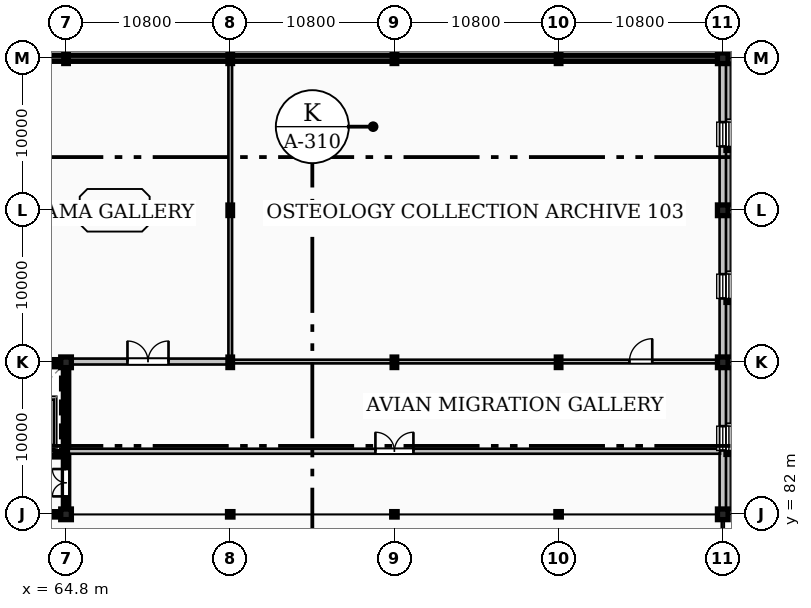
"""IFC4 building model, lengths in metres.
Left out: names, types, materials, properties, quantities, classifications, styles, units other than length and angle.
Written with IfcOpenShell. Run it as: python <this file> out.ifc"""

import sys

from ifc_helpers import new_model, si_unit, direction, frame, frame_2d, origin, origin_2d, place, context, subcontext, project, spatial, rectangle, hollow_circle, i_section, extrude, element, fill, save


model = new_model("IFC4")
c1 = context("Model", 3, precision=1e-05, world=origin(), true_north=direction((0.0, 1.0)))
c2 = subcontext(c1, "Body", "Model", "MODEL_VIEW")
j1 = project(units=[si_unit("LENGTHUNIT", "METRE"), si_unit("PLANEANGLEUNIT", "RADIAN")], contexts=[c1])
p1 = place(None, origin())
s1 = spatial("IfcSite", under=j1, at=p1, CompositionType="ELEMENT")
p2 = place(p1, origin())
s2 = spatial("IfcBuilding", under=s1, at=p2, CompositionType="ELEMENT")
p3 = place(p2, frame((0.0, 0.0, 4.8)))
s3 = spatial("IfcBuildingStorey", under=s2, at=p3, CompositionType="ELEMENT", Elevation=4.8)
p4 = place(p3, frame((32.4, 112.0, 0.0), z_axis=(0.0, 0.0, 1.0), x_axis=(1.0, 0.0, 0.0)))
e1 = element("IfcWall", 1, at=p4, inside=s3, PredefinedType="USERDEFINED", context=c2, shape_type="SweptSolid", body=[
    extrude(rectangle(XDim=32.4, YDim=0.4, at=frame_2d((16.2, 0.0))), origin(), (0.0, 0.0, 1.0), 4.56),
])
p5 = place(p3, frame((64.8, 112.0, 0.0), z_axis=(0.0, 0.0, 1.0), x_axis=(1.0, 0.0, 0.0)))
e2 = element("IfcWall", 2, at=p5, inside=s3, PredefinedType="USERDEFINED", context=c2, shape_type="SweptSolid", body=[
    extrude(rectangle(XDim=43.42, YDim=0.4, at=frame_2d((21.71, 0.0))), origin(), (0.0, 0.0, 1.0), 4.56),
])
for number, where, z_axis, x_axis in (
    (3, (64.8, 82.0, 0.0), (0.0, 0.0, 1.0), (1.0, 0.0, 0.0)),
    (4, (64.8, 92.0, 0.0), (0.0, 0.0, 1.0), (1.0, 0.0, 0.0)),
):
    element("IfcColumn", number, at=place(p3, frame(where, z_axis=z_axis, x_axis=x_axis)), inside=s3, PredefinedType="COLUMN", context=c2, shape_type="SweptSolid", body=[
        extrude(rectangle(XDim=0.7, YDim=0.7, at=origin_2d()), origin(), (0.0, 0.0, 1.0), 4.8),
    ])
for number, where, z_axis, x_axis in (
    (5, (64.8, 102.0, 0.0), (0.0, 0.0, 1.0), (1.0, 0.0, 0.0)),
    (6, (64.8, 112.0, 0.0), (0.0, 0.0, 1.0), (1.0, 0.0, 0.0)),
):
    element("IfcColumn", number, at=place(p3, frame(where, z_axis=z_axis, x_axis=x_axis)), inside=s3, PredefinedType="COLUMN", context=c2, shape_type="SweptSolid", body=[
        extrude(i_section(OverallWidth=0.3, OverallDepth=0.69, WebThickness=0.014, FlangeThickness=0.027, FilletRadius=0.027, at=origin_2d()), origin(), (0.0, 0.0, 1.0), 4.8),
    ])
p6 = place(p3, frame((75.6, 82.0, 0.0), z_axis=(0.0, 0.0, 1.0), x_axis=(1.0, 0.0, 0.0)))
e7 = element("IfcColumn", 7, at=p6, inside=s3, PredefinedType="COLUMN", context=c2, shape_type="SweptSolid", body=[
    extrude(hollow_circle(Radius=0.178, WallThickness=0.016, at=origin_2d()), origin(), (0.0, 0.0, 1.0), 4.8),
])
for number, where, z_axis, x_axis in (
    (8, (75.6, 92.0, 0.0), (0.0, 0.0, 1.0), (1.0, 0.0, 0.0)),
    (9, (75.6, 102.0, 0.0), (0.0, 0.0, 1.0), (1.0, 0.0, 0.0)),
    (10, (75.6, 112.0, 0.0), (0.0, 0.0, 1.0), (1.0, 0.0, 0.0)),
):
    element("IfcColumn", number, at=place(p3, frame(where, z_axis=z_axis, x_axis=x_axis)), inside=s3, PredefinedType="COLUMN", context=c2, shape_type="SweptSolid", body=[
        extrude(i_section(OverallWidth=0.3, OverallDepth=0.69, WebThickness=0.014, FlangeThickness=0.027, FilletRadius=0.027, at=origin_2d()), origin(), (0.0, 0.0, 1.0), 4.8),
    ])
p7 = place(p3, frame((86.4, 82.0, 0.0), z_axis=(0.0, 0.0, 1.0), x_axis=(1.0, 0.0, 0.0)))
e11 = element("IfcColumn", 11, at=p7, inside=s3, PredefinedType="COLUMN", context=c2, shape_type="SweptSolid", body=[
    extrude(hollow_circle(Radius=0.178, WallThickness=0.016, at=origin_2d()), origin(), (0.0, 0.0, 1.0), 4.8),
])
for number, where, z_axis, x_axis in (
    (12, (86.4, 92.0, 0.0), (0.0, 0.0, 1.0), (1.0, 0.0, 0.0)),
    (13, (86.4, 102.0, 0.0), (0.0, 0.0, 1.0), (1.0, 0.0, 0.0)),
    (14, (86.4, 112.0, 0.0), (0.0, 0.0, 1.0), (1.0, 0.0, 0.0)),
):
    element("IfcColumn", number, at=place(p3, frame(where, z_axis=z_axis, x_axis=x_axis)), inside=s3, PredefinedType="COLUMN", context=c2, shape_type="SweptSolid", body=[
        extrude(i_section(OverallWidth=0.3, OverallDepth=0.69, WebThickness=0.014, FlangeThickness=0.027, FilletRadius=0.027, at=origin_2d()), origin(), (0.0, 0.0, 1.0), 4.8),
    ])
p8 = place(p3, frame((97.2, 82.0, 0.0), z_axis=(0.0, 0.0, 1.0), x_axis=(1.0, 0.0, 0.0)))
e15 = element("IfcColumn", 15, at=p8, inside=s3, PredefinedType="COLUMN", context=c2, shape_type="SweptSolid", body=[
    extrude(hollow_circle(Radius=0.178, WallThickness=0.016, at=origin_2d()), origin(), (0.0, 0.0, 1.0), 4.8),
])
for number, where, z_axis, x_axis in (
    (16, (97.2, 92.0, 0.0), (0.0, 0.0, 1.0), (1.0, 0.0, 0.0)),
    (17, (97.2, 102.0, 0.0), (0.0, 0.0, 1.0), (1.0, 0.0, 0.0)),
    (18, (97.2, 112.0, 0.0), (0.0, 0.0, 1.0), (1.0, 0.0, 0.0)),
):
    element("IfcColumn", number, at=place(p3, frame(where, z_axis=z_axis, x_axis=x_axis)), inside=s3, PredefinedType="COLUMN", context=c2, shape_type="SweptSolid", body=[
        extrude(i_section(OverallWidth=0.3, OverallDepth=0.69, WebThickness=0.014, FlangeThickness=0.027, FilletRadius=0.027, at=origin_2d()), origin(), (0.0, 0.0, 1.0), 4.8),
    ])
for number, where, z_axis, x_axis in (
    (19, (108.0, 82.0, 0.0), (0.0, 0.0, 1.0), (1.0, 0.0, 0.0)),
    (20, (108.0, 92.0, 0.0), (0.0, 0.0, 1.0), (1.0, 0.0, 0.0)),
    (21, (108.0, 102.0, 0.0), (0.0, 0.0, 1.0), (1.0, 0.0, 0.0)),
    (22, (108.0, 112.0, 0.0), (0.0, 0.0, 1.0), (1.0, 0.0, 0.0)),
):
    element("IfcColumn", number, at=place(p3, frame(where, z_axis=z_axis, x_axis=x_axis)), inside=s3, PredefinedType="COLUMN", context=c2, shape_type="SweptSolid", body=[
        extrude(rectangle(XDim=0.7, YDim=0.7, at=origin_2d()), origin(), (0.0, 0.0, 1.0), 4.8),
    ])
p9 = place(p3, frame((108.0, 81.63, 0.0), z_axis=(0.0, 0.0, 1.0), x_axis=(0.0, 1.0, 0.0)))
e23 = element("IfcWall", 23, at=p9, inside=s3, PredefinedType="STANDARD", context=c2, shape_type="SweptSolid", body=[
    extrude(rectangle(XDim=0.225, YDim=0.3, at=frame_2d((0.113, 0.0))), origin(), (0.0, 0.0, 1.0), 4.56),
])
p10 = place(p3, frame((108.0, 82.145, 0.0), z_axis=(0.0, 0.0, 1.0), x_axis=(0.0, 1.0, 0.0)))
e24 = element("IfcWall", 24, at=p10, inside=s3, PredefinedType="STANDARD", context=c2, shape_type="SweptSolid", body=[
    extrude(rectangle(XDim=9.71, YDim=0.42, at=frame_2d((4.855, 0.0))), origin(), (0.0, 0.0, 1.0), 4.13),
])
p11 = place(p10, frame((4.055, 0.0, 1.2)))
e25 = element("IfcOpeningElement", 25, at=p11, cuts=e24, PredefinedType="OPENING", context=c2, shape_type="SweptSolid", body=[
    extrude(rectangle(XDim=1.6, YDim=1.8, at=frame_2d((0.8, 0.9))), frame((0.0, 0.22, 0.0), z_axis=(0.0, -1.0, 0.0), x_axis=(1.0, 0.0, 0.0)), (0.0, 0.0, 1.0), 0.44),
])
p12 = place(p3, frame((108.0, 92.145, 0.0), z_axis=(0.0, 0.0, 1.0), x_axis=(0.0, 1.0, 0.0)))
e26 = element("IfcWall", 26, at=p12, inside=s3, PredefinedType="STANDARD", context=c2, shape_type="SweptSolid", body=[
    extrude(rectangle(XDim=9.71, YDim=0.42, at=frame_2d((4.855, 0.0))), origin(), (0.0, 0.0, 1.0), 4.13),
])
p13 = place(p12, frame((4.055, 0.0, 1.2)))
e27 = element("IfcOpeningElement", 27, at=p13, cuts=e26, PredefinedType="OPENING", context=c2, shape_type="SweptSolid", body=[
    extrude(rectangle(XDim=1.6, YDim=1.8, at=frame_2d((0.8, 0.9))), frame((0.0, 0.22, 0.0), z_axis=(0.0, -1.0, 0.0), x_axis=(1.0, 0.0, 0.0)), (0.0, 0.0, 1.0), 0.44),
])
p14 = place(p3, frame((108.0, 102.145, 0.0), z_axis=(0.0, 0.0, 1.0), x_axis=(0.0, 1.0, 0.0)))
e28 = element("IfcWall", 28, at=p14, inside=s3, PredefinedType="STANDARD", context=c2, shape_type="SweptSolid", body=[
    extrude(rectangle(XDim=9.71, YDim=0.42, at=frame_2d((4.855, 0.0))), origin(), (0.0, 0.0, 1.0), 4.13),
])
p15 = place(p14, frame((4.055, 0.0, 1.2)))
e29 = element("IfcOpeningElement", 29, at=p15, cuts=e28, PredefinedType="OPENING", context=c2, shape_type="SweptSolid", body=[
    extrude(rectangle(XDim=1.6, YDim=1.8, at=frame_2d((0.8, 0.9))), frame((0.0, 0.22, 0.0), z_axis=(0.0, -1.0, 0.0), x_axis=(1.0, 0.0, 0.0)), (0.0, 0.0, 1.0), 0.44),
])
for number, where, z_axis, x_axis in (
    (30, (54.35, 82.0, 0.0), (0.0, 0.0, 1.0), (1.0, 0.0, 0.0)),
    (31, (54.35, 92.0, 0.0), (0.0, 0.0, 1.0), (1.0, 0.0, 0.0)),
):
    element("IfcWall", number, at=place(p3, frame(where, z_axis=z_axis, x_axis=x_axis)), inside=s3, PredefinedType="SHEAR", context=c2, shape_type="SweptSolid", body=[
        extrude(rectangle(XDim=10.1, YDim=0.35, at=frame_2d((5.05, 0.0))), origin(), (0.0, 0.0, 1.0), 4.56),
    ])
p16 = place(p3, frame((64.8, 82.35, 0.0), z_axis=(0.0, 0.0, 1.0), x_axis=(0.0, 1.0, 0.0)))
e32 = element("IfcWall", 32, at=p16, inside=s3, PredefinedType="SHEAR", context=c2, shape_type="SweptSolid", body=[
    extrude(rectangle(XDim=9.3, YDim=0.35, at=frame_2d((4.65, 0.0))), origin(), (0.0, 0.0, 1.0), 4.56),
])
p17 = place(p16, frame((0.83, 0.0, 0.0)))
e33 = element("IfcOpeningElement", 33, at=p17, cuts=e32, PredefinedType="OPENING", context=c2, shape_type="SweptSolid", body=[
    extrude(rectangle(XDim=1.8, YDim=2.25, at=frame_2d((0.9, 1.125))), frame((0.0, 0.185, 0.0), z_axis=(0.0, -1.0, 0.0), x_axis=(1.0, 0.0, 0.0)), (0.0, 0.0, 1.0), 0.37),
])
p18 = place(p3, frame((59.13, 85.95, 0.0), z_axis=(0.0, 0.0, 1.0), x_axis=(1.0, 0.0, 0.0)))
e34 = element("IfcWall", 34, at=p18, inside=s3, PredefinedType="SHEAR", context=c2, shape_type="SweptSolid", body=[
    extrude(rectangle(XDim=5.49, YDim=0.35, at=frame_2d((2.745, 0.0))), origin(), (0.0, 0.0, 1.0), 4.56),
])
p19 = place(p18, frame((0.65, 0.0, 0.0)))
e35 = element("IfcOpeningElement", 35, at=p19, cuts=e34, PredefinedType="OPENING", context=c2, shape_type="SweptSolid", body=[
    extrude(rectangle(XDim=1.1, YDim=2.2, at=frame_2d((0.55, 1.1))), frame((0.0, 0.185, 0.0), z_axis=(0.0, -1.0, 0.0), x_axis=(1.0, 0.0, 0.0)), (0.0, 0.0, 1.0), 0.37),
])
p20 = place(p18, frame((2.85, 0.0, 0.0)))
e36 = element("IfcOpeningElement", 36, at=p20, cuts=e34, PredefinedType="OPENING", context=c2, shape_type="SweptSolid", body=[
    extrude(rectangle(XDim=2.0, YDim=2.5, at=frame_2d((1.0, 1.25))), frame((0.0, 0.185, 0.0), z_axis=(0.0, -1.0, 0.0), x_axis=(1.0, 0.0, 0.0)), (0.0, 0.0, 1.0), 0.37),
])
p21 = place(p3, frame((64.98, 86.15, 0.0), z_axis=(0.0, 0.0, 1.0), x_axis=(1.0, 0.0, 0.0)))
e37 = element("IfcWall", 37, at=p21, inside=s3, PredefinedType="PARTITIONING", context=c2, shape_type="SweptSolid", body=[
    extrude(rectangle(XDim=42.84, YDim=0.33, at=frame_2d((21.42, 0.0))), origin(), (0.0, 0.0, 1.0), 4.52),
])
p22 = place(p21, frame((20.17, 0.0, 0.0)))
e38 = element("IfcOpeningElement", 38, at=p22, cuts=e37, PredefinedType="OPENING", context=c2, shape_type="SweptSolid", body=[
    extrude(rectangle(XDim=2.5, YDim=2.75, at=frame_2d((1.25, 1.375))), frame((0.0, 0.175, 0.0), z_axis=(0.0, -1.0, 0.0), x_axis=(1.0, 0.0, 0.0)), (0.0, 0.0, 1.0), 0.35),
])
p23 = place(p3, frame((64.98, 92.05, 0.0), z_axis=(0.0, 0.0, 1.0), x_axis=(1.0, 0.0, 0.0)))
e39 = element("IfcWall", 39, at=p23, inside=s3, PredefinedType="PARTITIONING", context=c2, shape_type="SweptSolid", body=[
    extrude(rectangle(XDim=10.42, YDim=0.39, at=frame_2d((5.21, 0.0))), origin(), (0.0, 0.0, 1.0), 4.069),
])
p24 = place(p23, frame((3.86, 0.0, 0.0)))
e40 = element("IfcOpeningElement", 40, at=p24, cuts=e39, PredefinedType="OPENING", context=c2, shape_type="SweptSolid", body=[
    extrude(rectangle(XDim=2.7, YDim=2.85, at=frame_2d((1.35, 1.425))), frame((0.0, 0.205, 0.0), z_axis=(0.0, -1.0, 0.0), x_axis=(1.0, 0.0, 0.0)), (0.0, 0.0, 1.0), 0.41),
])
for number, where, z_axis, x_axis in (
    (41, (75.8, 92.05, 0.0), (0.0, 0.0, 1.0), (1.0, 0.0, 0.0)),
    (42, (86.6, 92.05, 0.0), (0.0, 0.0, 1.0), (1.0, 0.0, 0.0)),
):
    element("IfcWall", number, at=place(p3, frame(where, z_axis=z_axis, x_axis=x_axis)), inside=s3, PredefinedType="SOLIDWALL", context=c2, shape_type="SweptSolid", body=[
        extrude(rectangle(XDim=10.4, YDim=0.24, at=frame_2d((5.2, 0.0))), origin(), (0.0, 0.0, 1.0), 4.069),
    ])
p25 = place(p3, frame((97.4, 92.05, 0.0), z_axis=(0.0, 0.0, 1.0), x_axis=(1.0, 0.0, 0.0)))
e43 = element("IfcWall", 43, at=p25, inside=s3, PredefinedType="SOLIDWALL", context=c2, shape_type="SweptSolid", body=[
    extrude(rectangle(XDim=10.42, YDim=0.24, at=frame_2d((5.21, 0.0))), origin(), (0.0, 0.0, 1.0), 4.13),
])
p26 = place(p25, frame((4.46, 0.0, 0.0)))
e44 = element("IfcOpeningElement", 44, at=p26, cuts=e43, PredefinedType="OPENING", context=c2, shape_type="SweptSolid", body=[
    extrude(rectangle(XDim=1.5, YDim=2.4, at=frame_2d((0.75, 1.2))), frame((0.0, 0.13, 0.0), z_axis=(0.0, -1.0, 0.0), x_axis=(1.0, 0.0, 0.0)), (0.0, 0.0, 1.0), 0.26),
])
for number, where, z_axis, x_axis in (
    (45, (75.6, 92.18, 0.0), (0.0, 0.0, 1.0), (0.0, 1.0, 0.0)),
    (46, (75.6, 102.2, 0.0), (0.0, 0.0, 1.0), (0.0, 1.0, 0.0)),
):
    element("IfcWall", number, at=place(p3, frame(where, z_axis=z_axis, x_axis=x_axis)), inside=s3, PredefinedType="SOLIDWALL", context=c2, shape_type="SweptSolid", body=[
        extrude(rectangle(XDim=9.62, YDim=0.24, at=frame_2d((4.81, 0.0))), origin(), (0.0, 0.0, 1.0), 4.06),
    ])
p27 = place(p11, origin())
e47 = element("IfcWindow", 47, at=p27, inside=s3, PartitioningType="SINGLE_PANEL", PredefinedType="WINDOW", context=c2, shape_type="SweptSolid", body=[
    extrude(rectangle(XDim=1.6, YDim=1.8, at=frame_2d((0.8, 0.9))), frame((0.0, 0.03, 0.0), z_axis=(0.0, -1.0, 0.0), x_axis=(1.0, 0.0, 0.0)), (0.0, 0.0, 1.0), 0.06),
])
fill(e25, e47)
p28 = place(p13, origin())
e48 = element("IfcWindow", 48, at=p28, inside=s3, PartitioningType="SINGLE_PANEL", PredefinedType="WINDOW", context=c2, shape_type="SweptSolid", body=[
    extrude(rectangle(XDim=1.6, YDim=1.8, at=frame_2d((0.8, 0.9))), frame((0.0, 0.03, 0.0), z_axis=(0.0, -1.0, 0.0), x_axis=(1.0, 0.0, 0.0)), (0.0, 0.0, 1.0), 0.06),
])
fill(e27, e48)
p29 = place(p15, origin())
e49 = element("IfcWindow", 49, at=p29, inside=s3, PartitioningType="SINGLE_PANEL", PredefinedType="WINDOW", context=c2, shape_type="SweptSolid", body=[
    extrude(rectangle(XDim=1.6, YDim=1.8, at=frame_2d((0.8, 0.9))), frame((0.0, 0.03, 0.0), z_axis=(0.0, -1.0, 0.0), x_axis=(1.0, 0.0, 0.0)), (0.0, 0.0, 1.0), 0.06),
])
fill(e29, e49)
p30 = place(p17, origin())
e50 = element("IfcDoor", 50, at=p30, inside=s3, OperationType="DOUBLE_DOOR_SINGLE_SWING", PredefinedType="DOOR", context=c2, shape_type="SweptSolid", body=[
    extrude(rectangle(XDim=1.8, YDim=2.25, at=frame_2d((0.9, 1.125))), frame((0.0, 0.025, 0.0), z_axis=(0.0, -1.0, 0.0), x_axis=(1.0, 0.0, 0.0)), (0.0, 0.0, 1.0), 0.05),
])
fill(e33, e50)
p31 = place(p20, origin())
e51 = element("IfcDoor", 51, at=p31, inside=s3, OperationType="DOUBLE_DOOR_SLIDING", PredefinedType="DOOR", context=c2, shape_type="SweptSolid", body=[
    extrude(rectangle(XDim=2.0, YDim=2.5, at=frame_2d((1.0, 1.25))), frame((0.0, 0.025, 0.0), z_axis=(0.0, -1.0, 0.0), x_axis=(1.0, 0.0, 0.0)), (0.0, 0.0, 1.0), 0.05),
])
fill(e36, e51)
p32 = place(p22, origin())
e52 = element("IfcDoor", 52, at=p32, inside=s3, OperationType="DOUBLE_DOOR_SINGLE_SWING", PredefinedType="DOOR", context=c2, shape_type="SweptSolid", body=[
    extrude(rectangle(XDim=2.5, YDim=2.75, at=frame_2d((1.25, 1.375))), frame((0.0, 0.025, 0.0), z_axis=(0.0, -1.0, 0.0), x_axis=(1.0, 0.0, 0.0)), (0.0, 0.0, 1.0), 0.05),
])
fill(e38, e52)
p33 = place(p24, origin())
e53 = element("IfcDoor", 53, at=p33, inside=s3, OperationType="DOUBLE_DOOR_SINGLE_SWING", PredefinedType="DOOR", context=c2, shape_type="SweptSolid", body=[
    extrude(rectangle(XDim=2.7, YDim=2.85, at=frame_2d((1.35, 1.425))), frame((0.0, 0.025, 0.0), z_axis=(0.0, -1.0, 0.0), x_axis=(1.0, 0.0, 0.0)), (0.0, 0.0, 1.0), 0.05),
])
fill(e40, e53)
p34 = place(p26, origin())
e54 = element("IfcDoor", 54, at=p34, inside=s3, OperationType="SINGLE_SWING_RIGHT", PredefinedType="DOOR", context=c2, shape_type="SweptSolid", body=[
    extrude(rectangle(XDim=1.5, YDim=2.4, at=frame_2d((0.75, 1.2))), frame((0.0, 0.025, 0.0), z_axis=(0.0, -1.0, 0.0), x_axis=(1.0, 0.0, 0.0)), (0.0, 0.0, 1.0), 0.05),
])
fill(e44, e54)
save(model, sys.argv[1])
